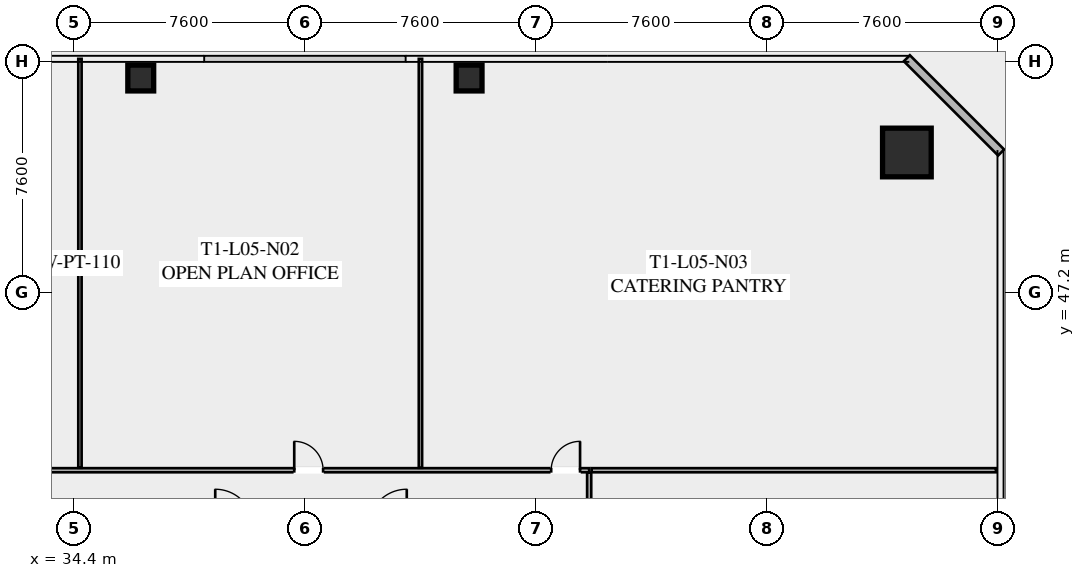
"""IFC4 building model, lengths in metres.
Left out: names, types, materials, properties, quantities, classifications, styles, units other than length and angle.
Written with IfcOpenShell. Run it as: python <this file> out.ifc"""

import sys

from ifc_helpers import new_model, si_unit, direction, frame, frame_2d, origin, origin_2d, place, context, subcontext, project, spatial, rectangle, hollow_rectangle, extrude, element, fill, save


model = new_model("IFC4")
c1 = context("Model", 3, precision=1e-05, world=origin(), true_north=direction((0.0, 1.0)))
c2 = subcontext(c1, "Body", "Model", "MODEL_VIEW")
j1 = project(units=[si_unit("LENGTHUNIT", "METRE"), si_unit("PLANEANGLEUNIT", "RADIAN")], contexts=[c1])
p1 = place(None, origin())
s1 = spatial("IfcSite", under=j1, at=p1, CompositionType="ELEMENT")
p2 = place(p1, origin())
s2 = spatial("IfcBuilding", under=s1, at=p2, CompositionType="ELEMENT")
p3 = place(p2, frame((0.0, 0.0, 24.6)))
s3 = spatial("IfcBuildingStorey", under=s2, at=p3, CompositionType="ELEMENT", Elevation=24.6)
p4 = place(p3, frame((61.8, 51.8, 0.0), z_axis=(0.0, 0.0, 1.0), x_axis=(1.0, 0.0, 0.0)))
e1 = element("IfcColumn", 1, at=p4, inside=s3, PredefinedType="COLUMN", context=c2, shape_type="SweptSolid", body=[
    extrude(hollow_rectangle(XDim=1.6, YDim=1.6, WallThickness=0.06, at=origin_2d()), origin(), (0.0, 0.0, 1.0), 3.35),
])
for number, where, z_axis, x_axis in (
    (2, (47.4, 54.25, 0.0), (0.0, 0.0, 1.0), (1.0, 0.0, 0.0)),
    (3, (36.6, 54.25, 0.0), (0.0, 0.0, 1.0), (1.0, 0.0, 0.0)),
):
    element("IfcColumn", number, at=place(p3, frame(where, z_axis=z_axis, x_axis=x_axis)), inside=s3, PredefinedType="COLUMN", context=c2, shape_type="SweptSolid", body=[
        extrude(hollow_rectangle(XDim=0.85, YDim=0.85, WallThickness=0.035, at=origin_2d()), origin(), (0.0, 0.0, 1.0), 3.35),
    ])
p5 = place(p3, frame((61.8, 54.9, 0.0), z_axis=(0.0, 0.0, 1.0), x_axis=(0.707106781187, -0.707106781187, 0.0)))
e4 = element("IfcWall", 4, at=p5, inside=s3, PredefinedType="SOLIDWALL", context=c2, shape_type="SweptSolid", body=[
    extrude(rectangle(XDim=4.384, YDim=0.28, at=frame_2d((2.192, 0.0))), origin(), (0.0, 0.0, 1.0), 3.35),
])
p6 = place(p3, frame((22.35, 41.35, 0.0), z_axis=(0.0, 0.0, 1.0), x_axis=(1.0, 0.0, 0.0)))
e5 = element("IfcWall", 5, at=p6, inside=s3, PredefinedType="PARTITIONING", context=c2, shape_type="SweptSolid", body=[
    extrude(rectangle(XDim=29.0, YDim=0.135, at=frame_2d((14.5, 0.0))), origin(), (0.0, 0.0, 1.0), 2.703),
])
p7 = place(p6, frame((0.3, 0.0, 0.0)))
e6 = element("IfcOpeningElement", 6, at=p7, cuts=e5, PredefinedType="OPENING", context=c2, shape_type="SweptSolid", body=[
    extrude(rectangle(XDim=0.95, YDim=2.05, at=frame_2d((0.475, 1.025))), frame((0.0, 0.077, 0.0), z_axis=(0.0, -1.0, 0.0), x_axis=(1.0, 0.0, 0.0)), (0.0, 0.0, 1.0), 0.155),
])
p8 = place(p6, frame((19.299, 0.0, 0.0)))
e7 = element("IfcOpeningElement", 7, at=p8, cuts=e5, PredefinedType="OPENING", context=c2, shape_type="SweptSolid", body=[
    extrude(rectangle(XDim=0.95, YDim=2.05, at=frame_2d((0.475, 1.025))), frame((0.0, 0.077, 0.0), z_axis=(0.0, -1.0, 0.0), x_axis=(1.0, 0.0, 0.0)), (0.0, 0.0, 1.0), 0.155),
])
p9 = place(p6, frame((27.75, 0.0, 0.0)))
e8 = element("IfcOpeningElement", 8, at=p9, cuts=e5, PredefinedType="OPENING", context=c2, shape_type="SweptSolid", body=[
    extrude(rectangle(XDim=0.95, YDim=2.05, at=frame_2d((0.475, 1.025))), frame((0.0, 0.077, 0.0), z_axis=(0.0, -1.0, 0.0), x_axis=(1.0, 0.0, 0.0)), (0.0, 0.0, 1.0), 0.155),
])
for number, where, z_axis, x_axis in (
    (9, (34.6, 41.43, 0.0), (0.0, 0.0, 1.0), (0.0, 1.0, 0.0)),
    (10, (45.8, 41.43, 0.0), (0.0, 0.0, 1.0), (0.0, 1.0, 0.0)),
):
    element("IfcWall", number, at=place(p3, frame(where, z_axis=z_axis, x_axis=x_axis)), inside=s3, PredefinedType="PARTITIONING", context=c2, shape_type="SweptSolid", body=[
        extrude(rectangle(XDim=13.45, YDim=0.11, at=frame_2d((6.725, 0.0))), origin(), (0.0, 0.0, 1.0), 2.703),
    ])
p10 = place(p3, frame((51.35, 41.27, 0.0), z_axis=(0.0, 0.0, 1.0), x_axis=(0.0, -1.0, 0.0)))
e11 = element("IfcWall", 11, at=p10, inside=s3, PredefinedType="PARTITIONING", context=c2, shape_type="SweptSolid", body=[
    extrude(rectangle(XDim=18.86, YDim=0.135, at=frame_2d((9.43, 0.0))), origin(), (0.0, 0.0, 1.0), 2.703),
])
p11 = place(p10, frame((8.579, 0.0, 0.0)))
e12 = element("IfcOpeningElement", 12, at=p11, cuts=e11, PredefinedType="OPENING", context=c2, shape_type="SweptSolid", body=[
    extrude(rectangle(XDim=0.95, YDim=2.05, at=frame_2d((0.475, 1.025))), frame((0.0, 0.077, 0.0), z_axis=(0.0, -1.0, 0.0), x_axis=(1.0, 0.0, 0.0)), (0.0, 0.0, 1.0), 0.155),
])
p12 = place(p3, frame((64.73, 41.35, 0.0), z_axis=(0.0, 0.0, 1.0), x_axis=(-1.0, 0.0, 0.0)))
e13 = element("IfcWall", 13, at=p12, inside=s3, PredefinedType="PARTITIONING", context=c2, shape_type="SweptSolid", body=[
    extrude(rectangle(XDim=13.3, YDim=0.135, at=frame_2d((6.65, 0.0))), origin(), (0.0, 0.0, 1.0), 2.703),
])
p13 = place(p8, origin())
e14 = element("IfcDoor", 14, at=p13, inside=s3, OperationType="SINGLE_SWING_LEFT", PredefinedType="DOOR", context=c2, shape_type="SweptSolid", body=[
    extrude(rectangle(XDim=0.95, YDim=2.05, at=frame_2d((0.475, 1.025))), frame((0.0, 0.025, 0.0), z_axis=(0.0, -1.0, 0.0), x_axis=(1.0, 0.0, 0.0)), (0.0, 0.0, 1.0), 0.05),
])
fill(e7, e14)
p14 = place(p9, origin())
e15 = element("IfcDoor", 15, at=p14, inside=s3, OperationType="SINGLE_SWING_RIGHT", PredefinedType="DOOR", context=c2, shape_type="SweptSolid", body=[
    extrude(rectangle(XDim=0.95, YDim=2.05, at=frame_2d((0.475, 1.025))), frame((0.0, 0.025, 0.0), z_axis=(0.0, -1.0, 0.0), x_axis=(1.0, 0.0, 0.0)), (0.0, 0.0, 1.0), 0.05),
])
fill(e8, e15)
save(model, sys.argv[1])
